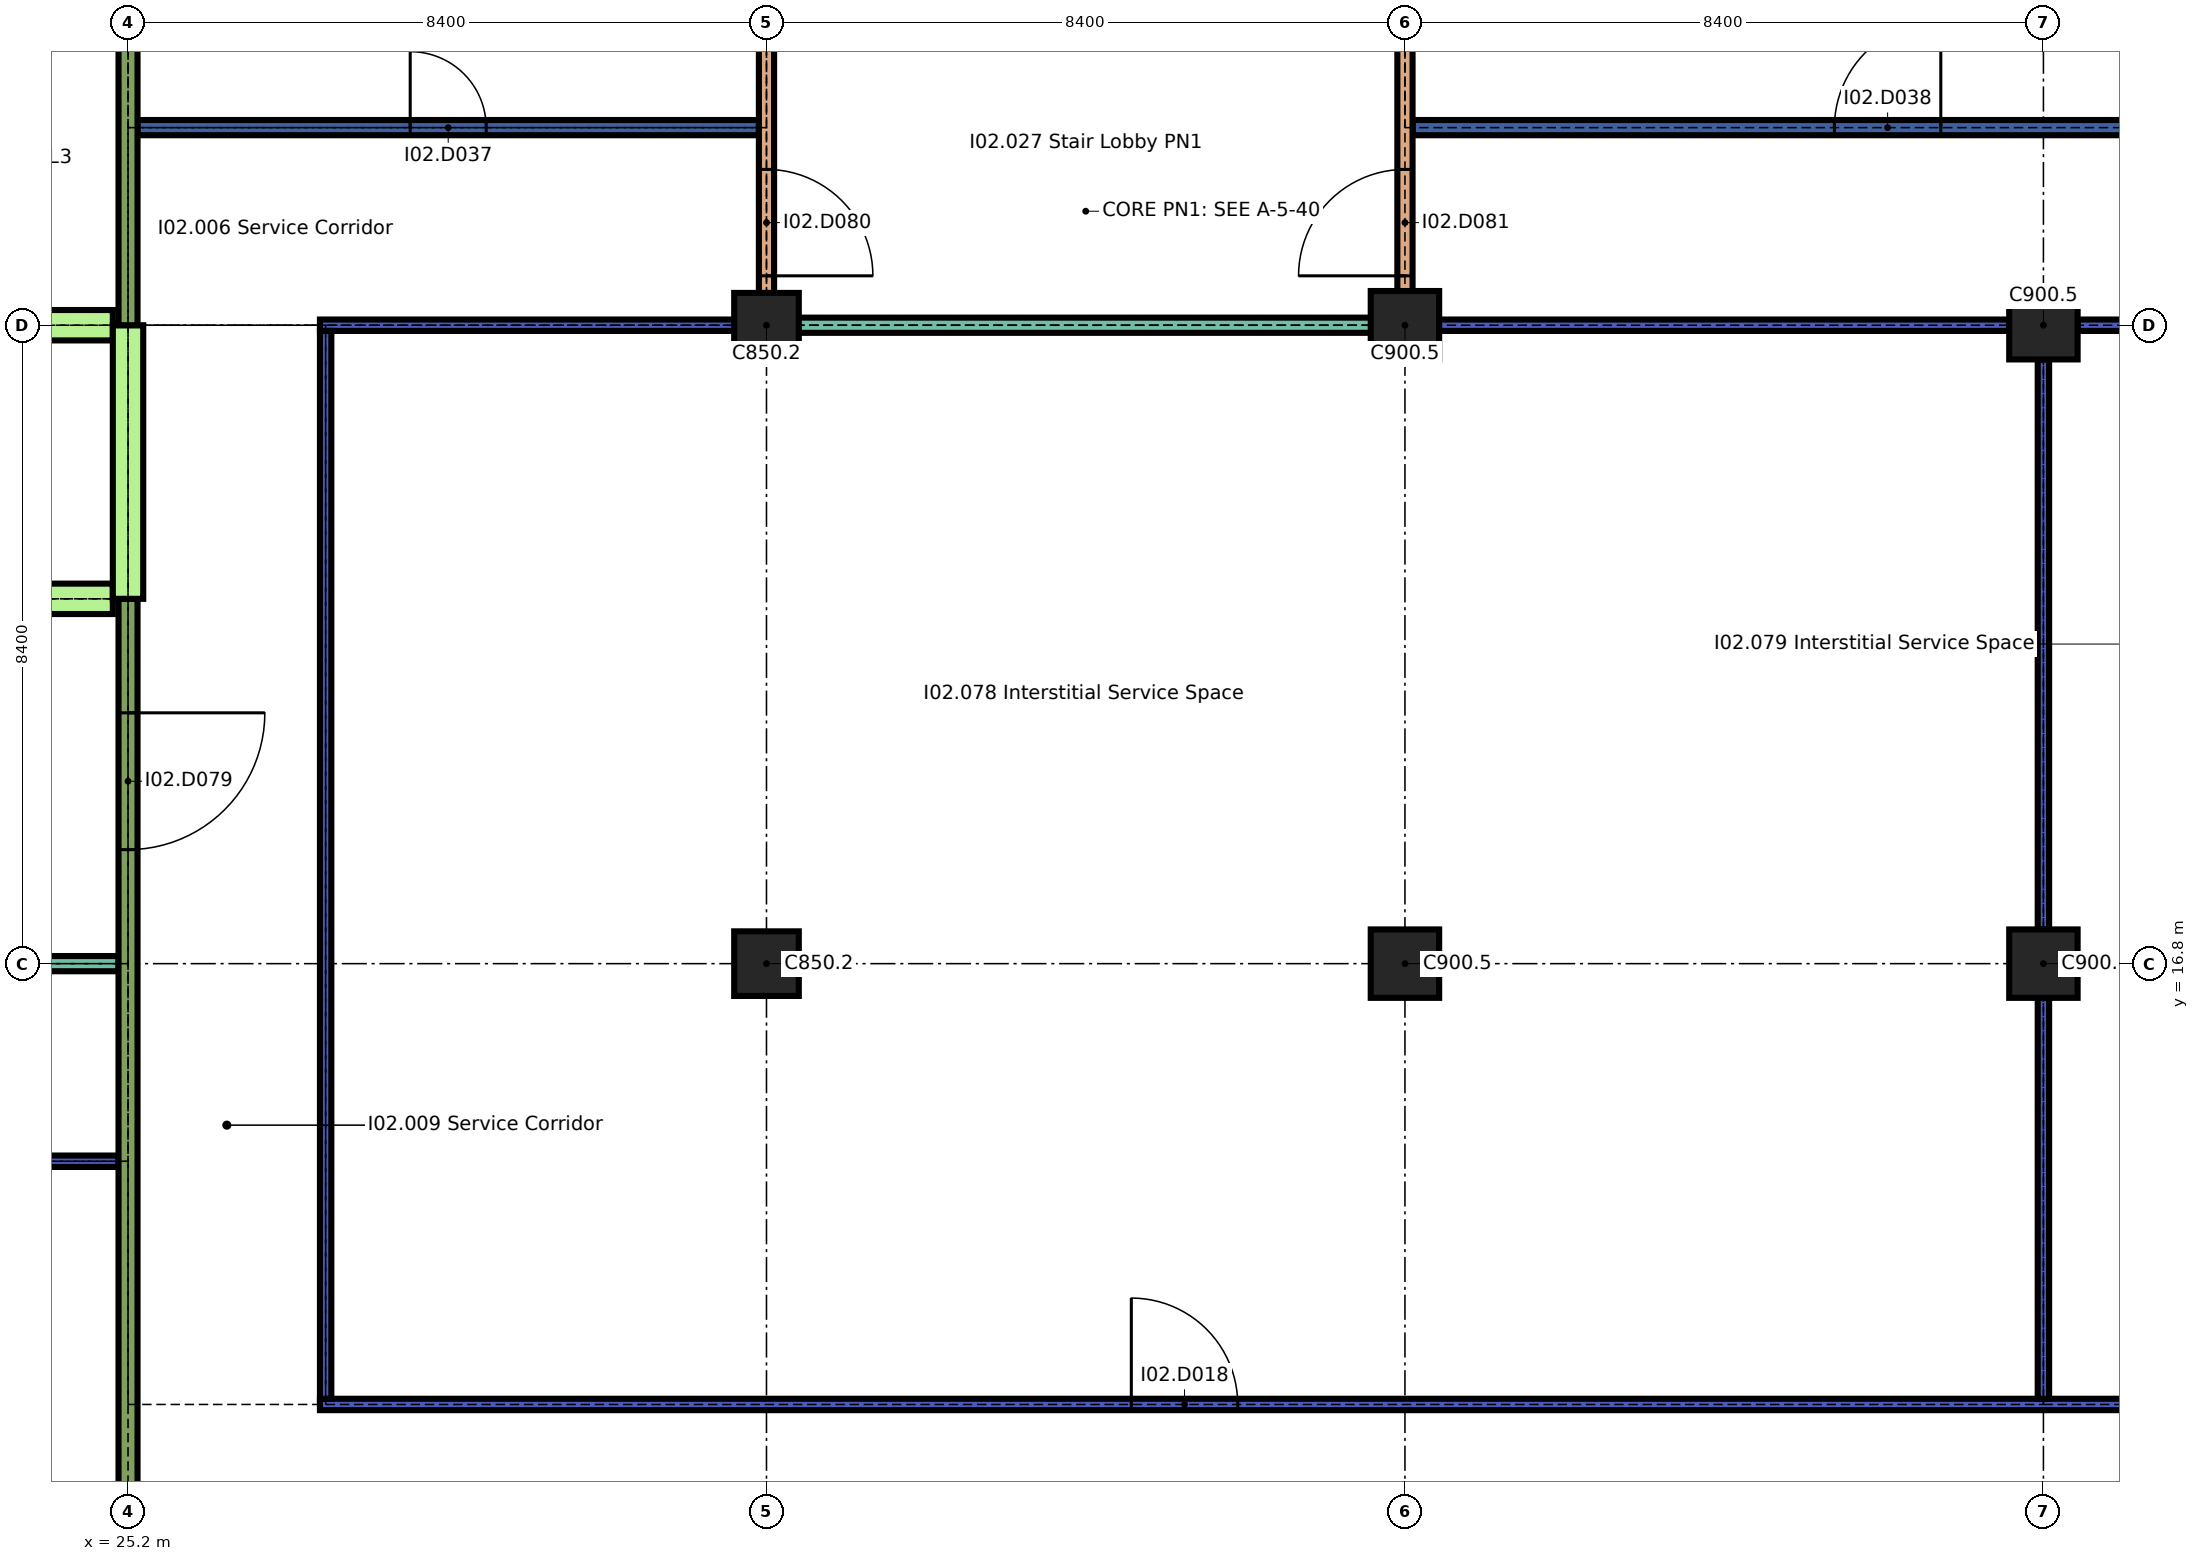
"""IFC4 building model, lengths in metres.
Left out: names, types, materials, properties, quantities, classifications, styles, units other than length and angle.
Written with IfcOpenShell. Run it as: python <this file> out.ifc"""

import sys

from ifc_helpers import new_model, si_unit, direction, frame, frame_2d, origin, origin_2d, place, context, subcontext, project, spatial, rectangle, extrude, element, fill, save


model = new_model("IFC4")
c1 = context("Model", 3, precision=1e-05, world=origin(), true_north=direction((0.0, 1.0)))
c2 = subcontext(c1, "Body", "Model", "MODEL_VIEW")
j1 = project(units=[si_unit("LENGTHUNIT", "METRE"), si_unit("PLANEANGLEUNIT", "RADIAN")], contexts=[c1])
p1 = place(None, origin())
s1 = spatial("IfcSite", under=j1, at=p1, CompositionType="ELEMENT")
p2 = place(p1, origin())
s2 = spatial("IfcBuilding", under=s1, at=p2, CompositionType="ELEMENT")
p3 = place(p2, frame((0.0, 0.0, 12.9)))
s3 = spatial("IfcBuildingStorey", under=s2, at=p3, CompositionType="ELEMENT", Elevation=12.9)
p4 = place(p3, frame((33.6, 16.8, 0.0), z_axis=(0.0, 0.0, 1.0), x_axis=(1.0, 0.0, 0.0)))
e1 = element("IfcColumn", 1, at=p4, inside=s3, PredefinedType="COLUMN", context=c2, shape_type="SweptSolid", body=[
    extrude(rectangle(XDim=0.85, YDim=0.85, at=origin_2d()), origin(), (0.0, 0.0, 1.0), 2.04),
])
for number, where, z_axis, x_axis in (
    (2, (42.0, 16.8, 0.0), (0.0, 0.0, 1.0), (1.0, 0.0, 0.0)),
    (3, (50.4, 16.8, 0.0), (0.0, 0.0, 1.0), (1.0, 0.0, 0.0)),
    (4, (50.4, 25.2, 0.0), (0.0, 0.0, 1.0), (1.0, 0.0, 0.0)),
):
    element("IfcColumn", number, at=place(p3, frame(where, z_axis=z_axis, x_axis=x_axis)), inside=s3, PredefinedType="COLUMN", context=c2, shape_type="SweptSolid", body=[
        extrude(rectangle(XDim=0.9, YDim=0.9, at=origin_2d()), origin(), (0.0, 0.0, 1.0), 2.04),
    ])
p5 = place(p3, frame((27.725, 11.0, 0.0), z_axis=(0.0, 0.0, 1.0), x_axis=(1.0, 0.0, 0.0)))
e5 = element("IfcWall", 5, at=p5, inside=s3, PredefinedType="PARTITIONING", context=c2, shape_type="SweptSolid", body=[
    extrude(rectangle(XDim=26.35, YDim=0.15, at=frame_2d((13.175, 0.0))), origin(), (0.0, 0.0, 1.0), 2.04),
])
p6 = place(p5, frame((10.675, 0.0, 0.0)))
e6 = element("IfcOpeningElement", 6, at=p6, cuts=e5, PredefinedType="OPENING", context=c2, shape_type="SweptSolid", body=[
    extrude(rectangle(XDim=1.4, YDim=2.0, at=frame_2d((0.7, 1.0))), frame((0.0, 0.085, 0.0), z_axis=(0.0, -1.0, 0.0), x_axis=(1.0, 0.0, 0.0)), (0.0, 0.0, 1.0), 0.17),
])
p7 = place(p3, frame((12.6, 14.2, 0.0), z_axis=(0.0, 0.0, 1.0), x_axis=(1.0, 0.0, 0.0)))
e7 = element("IfcWall", 7, at=p7, inside=s3, PredefinedType="PARTITIONING", context=c2, shape_type="SweptSolid", body=[
    extrude(rectangle(XDim=12.475, YDim=0.15, at=frame_2d((6.237, 0.0))), origin(), (0.0, 0.0, 1.0), 2.04),
])
p8 = place(p7, frame((5.538, 0.0, 0.0)))
e8 = element("IfcOpeningElement", 8, at=p8, cuts=e7, PredefinedType="OPENING", context=c2, shape_type="SweptSolid", body=[
    extrude(rectangle(XDim=1.4, YDim=2.0, at=frame_2d((0.7, 1.0))), frame((0.0, 0.085, 0.0), z_axis=(0.0, -1.0, 0.0), x_axis=(1.0, 0.0, 0.0)), (0.0, 0.0, 1.0), 0.17),
])
p9 = place(p3, frame((16.7, 16.8, 0.0), z_axis=(0.0, 0.0, 1.0), x_axis=(1.0, 0.0, 0.0)))
e9 = element("IfcWall", 9, at=p9, inside=s3, PredefinedType="PARTITIONING", context=c2, shape_type="SweptSolid", body=[
    extrude(rectangle(XDim=8.375, YDim=0.2, at=frame_2d((4.188, 0.0))), origin(), (0.0, 0.0, 1.0), 2.04),
])
p10 = place(p9, frame((3.337, 0.0, 0.0)))
e10 = element("IfcOpeningElement", 10, at=p10, cuts=e9, PredefinedType="OPENING", context=c2, shape_type="SweptSolid", body=[
    extrude(rectangle(XDim=1.8, YDim=2.0, at=frame_2d((0.9, 1.0))), frame((0.0, 0.11, 0.0), z_axis=(0.0, -1.0, 0.0), x_axis=(1.0, 0.0, 0.0)), (0.0, 0.0, 1.0), 0.22),
])
p11 = place(p3, frame((17.0, 21.6, 0.0), z_axis=(0.0, 0.0, 1.0), x_axis=(1.0, 0.0, 0.0)))
e11 = element("IfcWall", 11, at=p11, inside=s3, PredefinedType="SHEAR", context=c2, shape_type="SweptSolid", body=[
    extrude(rectangle(XDim=8.0, YDim=0.4, at=frame_2d((4.0, 0.0))), origin(), (0.0, 0.0, 1.0), 2.04),
])
p12 = place(p11, frame((1.3, 0.0, 0.0)))
e12 = element("IfcOpeningElement", 12, at=p12, cuts=e11, PredefinedType="OPENING", context=c2, shape_type="SweptSolid", body=[
    extrude(rectangle(XDim=1.4, YDim=2.0, at=frame_2d((0.7, 1.0))), frame((0.0, 0.21, 0.0), z_axis=(0.0, -1.0, 0.0), x_axis=(1.0, 0.0, 0.0)), (0.0, 0.0, 1.0), 0.42),
])
p13 = place(p3, frame((17.0, 25.2, 0.0), z_axis=(0.0, 0.0, 1.0), x_axis=(1.0, 0.0, 0.0)))
e13 = element("IfcWall", 13, at=p13, inside=s3, PredefinedType="SHEAR", context=c2, shape_type="SweptSolid", body=[
    extrude(rectangle(XDim=8.0, YDim=0.4, at=frame_2d((4.0, 0.0))), origin(), (0.0, 0.0, 1.0), 2.04),
])
p14 = place(p3, frame((27.725, 25.2, 0.0), z_axis=(0.0, 0.0, 1.0), x_axis=(1.0, 0.0, 0.0)))
e14 = element("IfcWall", 14, at=p14, inside=s3, PredefinedType="PARTITIONING", context=c2, shape_type="SweptSolid", body=[
    extrude(rectangle(XDim=5.875, YDim=0.15, at=frame_2d((2.938, 0.0))), origin(), (0.0, 0.0, 1.0), 2.04),
])
p15 = place(p3, frame((33.6, 25.2, 0.0), z_axis=(0.0, 0.0, 1.0), x_axis=(1.0, 0.0, 0.0)))
e15 = element("IfcWall", 15, at=p15, inside=s3, PredefinedType="PARTITIONING", context=c2, shape_type="SweptSolid", body=[
    extrude(rectangle(XDim=8.4, YDim=0.2, at=frame_2d((4.2, 0.0))), origin(), (0.0, 0.0, 1.0), 2.04),
])
p16 = place(p3, frame((42.0, 25.2, 0.0), z_axis=(0.0, 0.0, 1.0), x_axis=(1.0, 0.0, 0.0)))
e16 = element("IfcWall", 16, at=p16, inside=s3, PredefinedType="PARTITIONING", context=c2, shape_type="SweptSolid", body=[
    extrude(rectangle(XDim=7.95, YDim=0.15, at=frame_2d((3.975, 0.0))), origin(), (0.0, 0.0, 1.0), 2.04),
])
p17 = place(p3, frame((50.85, 25.2, 0.0), z_axis=(0.0, 0.0, 1.0), x_axis=(1.0, 0.0, 0.0)))
e17 = element("IfcWall", 17, at=p17, inside=s3, PredefinedType="PARTITIONING", context=c2, shape_type="SweptSolid", body=[
    extrude(rectangle(XDim=3.225, YDim=0.15, at=frame_2d((1.612, 0.0))), origin(), (0.0, 0.0, 1.0), 2.04),
])
p18 = place(p3, frame((25.325, 27.8, 0.0), z_axis=(0.0, 0.0, 1.0), x_axis=(1.0, 0.0, 0.0)))
e18 = element("IfcWall", 18, at=p18, inside=s3, PredefinedType="SOLIDWALL", context=c2, shape_type="SweptSolid", body=[
    extrude(rectangle(XDim=8.175, YDim=0.2, at=frame_2d((4.087, 0.0))), origin(), (0.0, 0.0, 1.0), 2.1),
])
p19 = place(p18, frame((3.587, 0.0, 0.0)))
e19 = element("IfcOpeningElement", 19, at=p19, cuts=e18, PredefinedType="OPENING", context=c2, shape_type="SweptSolid", body=[
    extrude(rectangle(XDim=1.0, YDim=2.0, at=frame_2d((0.5, 1.0))), frame((0.0, 0.11, 0.0), z_axis=(0.0, -1.0, 0.0), x_axis=(1.0, 0.0, 0.0)), (0.0, 0.0, 1.0), 0.22),
])
p20 = place(p3, frame((42.1, 27.8, 0.0), z_axis=(0.0, 0.0, 1.0), x_axis=(1.0, 0.0, 0.0)))
e20 = element("IfcWall", 20, at=p20, inside=s3, PredefinedType="SOLIDWALL", context=c2, shape_type="SweptSolid", body=[
    extrude(rectangle(XDim=64.1, YDim=0.2, at=frame_2d((32.05, 0.0))), origin(), (0.0, 0.0, 1.0), 2.1),
])
p21 = place(p20, frame((5.55, 0.0, 0.0)))
e21 = element("IfcOpeningElement", 21, at=p21, cuts=e20, PredefinedType="OPENING", context=c2, shape_type="SweptSolid", body=[
    extrude(rectangle(XDim=1.4, YDim=2.0, at=frame_2d((0.7, 1.0))), frame((0.0, 0.11, 0.0), z_axis=(0.0, -1.0, 0.0), x_axis=(1.0, 0.0, 0.0)), (0.0, 0.0, 1.0), 0.22),
])
p22 = place(p20, frame((16.2, 0.0, 0.0)))
e22 = element("IfcOpeningElement", 22, at=p22, cuts=e20, PredefinedType="OPENING", context=c2, shape_type="SweptSolid", body=[
    extrude(rectangle(XDim=1.0, YDim=2.0, at=frame_2d((0.5, 1.0))), frame((0.0, 0.11, 0.0), z_axis=(0.0, -1.0, 0.0), x_axis=(1.0, 0.0, 0.0)), (0.0, 0.0, 1.0), 0.22),
])
p23 = place(p20, frame((24.6, 0.0, 0.0)))
e23 = element("IfcOpeningElement", 23, at=p23, cuts=e20, PredefinedType="OPENING", context=c2, shape_type="SweptSolid", body=[
    extrude(rectangle(XDim=1.0, YDim=2.0, at=frame_2d((0.5, 1.0))), frame((0.0, 0.11, 0.0), z_axis=(0.0, -1.0, 0.0), x_axis=(1.0, 0.0, 0.0)), (0.0, 0.0, 1.0), 0.22),
])
p24 = place(p20, frame((30.9, 0.0, 0.0)))
e24 = element("IfcOpeningElement", 24, at=p24, cuts=e20, PredefinedType="OPENING", context=c2, shape_type="SweptSolid", body=[
    extrude(rectangle(XDim=1.0, YDim=2.0, at=frame_2d((0.5, 1.0))), frame((0.0, 0.11, 0.0), z_axis=(0.0, -1.0, 0.0), x_axis=(1.0, 0.0, 0.0)), (0.0, 0.0, 1.0), 0.22),
])
p25 = place(p20, frame((41.2, 0.0, 0.0)))
e25 = element("IfcOpeningElement", 25, at=p25, cuts=e20, PredefinedType="OPENING", context=c2, shape_type="SweptSolid", body=[
    extrude(rectangle(XDim=1.4, YDim=2.0, at=frame_2d((0.7, 1.0))), frame((0.0, 0.11, 0.0), z_axis=(0.0, -1.0, 0.0), x_axis=(1.0, 0.0, 0.0)), (0.0, 0.0, 1.0), 0.22),
])
p26 = place(p20, frame((54.0, 0.0, 0.0)))
e26 = element("IfcOpeningElement", 26, at=p26, cuts=e20, PredefinedType="OPENING", context=c2, shape_type="SweptSolid", body=[
    extrude(rectangle(XDim=1.0, YDim=2.0, at=frame_2d((0.5, 1.0))), frame((0.0, 0.11, 0.0), z_axis=(0.0, -1.0, 0.0), x_axis=(1.0, 0.0, 0.0)), (0.0, 0.0, 1.0), 0.22),
])
p27 = place(p20, frame((60.9, 0.0, 0.0)))
e27 = element("IfcOpeningElement", 27, at=p27, cuts=e20, PredefinedType="OPENING", context=c2, shape_type="SweptSolid", body=[
    extrude(rectangle(XDim=1.0, YDim=2.0, at=frame_2d((0.5, 1.0))), frame((0.0, 0.11, 0.0), z_axis=(0.0, -1.0, 0.0), x_axis=(1.0, 0.0, 0.0)), (0.0, 0.0, 1.0), 0.22),
])
p28 = place(p3, frame((25.2, 8.825, 0.0), z_axis=(0.0, 0.0, 1.0), x_axis=(0.0, 1.0, 0.0)))
e28 = element("IfcWall", 28, at=p28, inside=s3, PredefinedType="SOLIDWALL", context=c2, shape_type="SweptSolid", body=[
    extrude(rectangle(XDim=12.775, YDim=0.25, at=frame_2d((6.388, 0.0))), origin(), (0.0, 0.0, 1.0), 2.04),
])
p29 = place(p28, frame((9.475, 0.0, 0.0)))
e29 = element("IfcOpeningElement", 29, at=p29, cuts=e28, PredefinedType="OPENING", context=c2, shape_type="SweptSolid", body=[
    extrude(rectangle(XDim=1.8, YDim=2.0, at=frame_2d((0.9, 1.0))), frame((0.0, 0.135, 0.0), z_axis=(0.0, -1.0, 0.0), x_axis=(1.0, 0.0, 0.0)), (0.0, 0.0, 1.0), 0.27),
])
p30 = place(p3, frame((25.2, 21.6, 0.0), z_axis=(0.0, 0.0, 1.0), x_axis=(0.0, 1.0, 0.0)))
e30 = element("IfcWall", 30, at=p30, inside=s3, PredefinedType="SHEAR", context=c2, shape_type="SweptSolid", body=[
    extrude(rectangle(XDim=3.6, YDim=0.4, at=frame_2d((1.8, 0.0))), origin(), (0.0, 0.0, 1.0), 2.04),
])
p31 = place(p3, frame((25.2, 25.2, 0.0), z_axis=(0.0, 0.0, 1.0), x_axis=(0.0, 1.0, 0.0)))
e31 = element("IfcWall", 31, at=p31, inside=s3, PredefinedType="SOLIDWALL", context=c2, shape_type="SweptSolid", body=[
    extrude(rectangle(XDim=7.975, YDim=0.25, at=frame_2d((3.988, 0.0))), origin(), (0.0, 0.0, 1.0), 2.04),
])
p32 = place(p3, frame((27.8, 11.075, 0.0), z_axis=(0.0, 0.0, 1.0), x_axis=(0.0, 1.0, 0.0)))
e32 = element("IfcWall", 32, at=p32, inside=s3, PredefinedType="PARTITIONING", context=c2, shape_type="SweptSolid", body=[
    extrude(rectangle(XDim=14.05, YDim=0.15, at=frame_2d((7.025, 0.0))), origin(), (0.0, 0.0, 1.0), 2.04),
])
p33 = place(p3, frame((33.6, 25.3, 0.0), z_axis=(0.0, 0.0, 1.0), x_axis=(0.0, 1.0, 0.0)))
e33 = element("IfcWall", 33, at=p33, inside=s3, PredefinedType="PARTITIONING", context=c2, shape_type="SweptSolid", body=[
    extrude(rectangle(XDim=4.7, YDim=0.2, at=frame_2d((2.35, 0.0))), origin(), (0.0, 0.0, 1.0), 2.1),
])
p34 = place(p33, frame((0.55, 0.0, 0.0)))
e34 = element("IfcOpeningElement", 34, at=p34, cuts=e33, PredefinedType="OPENING", context=c2, shape_type="SweptSolid", body=[
    extrude(rectangle(XDim=1.4, YDim=2.0, at=frame_2d((0.7, 1.0))), frame((0.0, 0.11, 0.0), z_axis=(0.0, -1.0, 0.0), x_axis=(1.0, 0.0, 0.0)), (0.0, 0.0, 1.0), 0.22),
])
p35 = place(p3, frame((42.0, 25.3, 0.0), z_axis=(0.0, 0.0, 1.0), x_axis=(0.0, 1.0, 0.0)))
e35 = element("IfcWall", 35, at=p35, inside=s3, PredefinedType="PARTITIONING", context=c2, shape_type="SweptSolid", body=[
    extrude(rectangle(XDim=4.7, YDim=0.2, at=frame_2d((2.35, 0.0))), origin(), (0.0, 0.0, 1.0), 2.1),
])
p36 = place(p35, frame((0.55, 0.0, 0.0)))
e36 = element("IfcOpeningElement", 36, at=p36, cuts=e35, PredefinedType="OPENING", context=c2, shape_type="SweptSolid", body=[
    extrude(rectangle(XDim=1.4, YDim=2.0, at=frame_2d((0.7, 1.0))), frame((0.0, 0.11, 0.0), z_axis=(0.0, -1.0, 0.0), x_axis=(1.0, 0.0, 0.0)), (0.0, 0.0, 1.0), 0.22),
])
p37 = place(p3, frame((50.4, 11.075, 0.0), z_axis=(0.0, 0.0, 1.0), x_axis=(0.0, 1.0, 0.0)))
e37 = element("IfcWall", 37, at=p37, inside=s3, PredefinedType="PARTITIONING", context=c2, shape_type="SweptSolid", body=[
    extrude(rectangle(XDim=5.275, YDim=0.15, at=frame_2d((2.638, 0.0))), origin(), (0.0, 0.0, 1.0), 2.04),
])
p38 = place(p3, frame((50.4, 17.25, 0.0), z_axis=(0.0, 0.0, 1.0), x_axis=(0.0, 1.0, 0.0)))
e38 = element("IfcWall", 38, at=p38, inside=s3, PredefinedType="PARTITIONING", context=c2, shape_type="SweptSolid", body=[
    extrude(rectangle(XDim=7.5, YDim=0.15, at=frame_2d((3.75, 0.0))), origin(), (0.0, 0.0, 1.0), 2.04),
])
p39 = place(p3, frame((33.6, 25.2, 0.0), z_axis=(0.0, 0.0, 1.0), x_axis=(1.0, 0.0, 0.0)))
e39 = element("IfcColumn", 39, at=p39, inside=s3, PredefinedType="COLUMN", context=c2, shape_type="SweptSolid", body=[
    extrude(rectangle(XDim=0.85, YDim=0.85, at=origin_2d()), origin(), (0.0, 0.0, 1.0), 2.04),
])
p40 = place(p3, frame((42.0, 25.2, 0.0), z_axis=(0.0, 0.0, 1.0), x_axis=(1.0, 0.0, 0.0)))
e40 = element("IfcColumn", 40, at=p40, inside=s3, PredefinedType="COLUMN", context=c2, shape_type="SweptSolid", body=[
    extrude(rectangle(XDim=0.9, YDim=0.9, at=origin_2d()), origin(), (0.0, 0.0, 1.0), 2.04),
])
p41 = place(p6, origin())
e41 = element("IfcDoor", 41, at=p41, inside=s3, OperationType="SINGLE_SWING_RIGHT", PredefinedType="DOOR", context=c2, shape_type="SweptSolid", body=[
    extrude(rectangle(XDim=1.4, YDim=2.0, at=frame_2d((0.7, 1.0))), frame((0.0, 0.025, 0.0), z_axis=(0.0, -1.0, 0.0), x_axis=(1.0, 0.0, 0.0)), (0.0, 0.0, 1.0), 0.05),
])
fill(e6, e41)
p42 = place(p19, origin())
e42 = element("IfcDoor", 42, at=p42, inside=s3, OperationType="SINGLE_SWING_RIGHT", PredefinedType="DOOR", context=c2, shape_type="SweptSolid", body=[
    extrude(rectangle(XDim=1.0, YDim=2.0, at=frame_2d((0.5, 1.0))), frame((0.0, 0.025, 0.0), z_axis=(0.0, -1.0, 0.0), x_axis=(1.0, 0.0, 0.0)), (0.0, 0.0, 1.0), 0.05),
])
fill(e19, e42)
p43 = place(p21, origin())
e43 = element("IfcDoor", 43, at=p43, inside=s3, OperationType="SINGLE_SWING_LEFT", PredefinedType="DOOR", context=c2, shape_type="SweptSolid", body=[
    extrude(rectangle(XDim=1.4, YDim=2.0, at=frame_2d((0.7, 1.0))), frame((0.0, 0.025, 0.0), z_axis=(0.0, -1.0, 0.0), x_axis=(1.0, 0.0, 0.0)), (0.0, 0.0, 1.0), 0.05),
])
fill(e21, e43)
p44 = place(p29, origin())
e44 = element("IfcDoor", 44, at=p44, inside=s3, OperationType="SINGLE_SWING_RIGHT", PredefinedType="DOOR", context=c2, shape_type="SweptSolid", body=[
    extrude(rectangle(XDim=1.8, YDim=2.0, at=frame_2d((0.9, 1.0))), frame((0.0, 0.03, 0.0), z_axis=(0.0, -1.0, 0.0), x_axis=(1.0, 0.0, 0.0)), (0.0, 0.0, 1.0), 0.06),
])
fill(e29, e44)
p45 = place(p34, origin())
e45 = element("IfcDoor", 45, at=p45, inside=s3, OperationType="SINGLE_SWING_LEFT", PredefinedType="DOOR", context=c2, shape_type="SweptSolid", body=[
    extrude(rectangle(XDim=1.4, YDim=2.0, at=frame_2d((0.7, 1.0))), frame((0.0, 0.03, 0.0), z_axis=(0.0, -1.0, 0.0), x_axis=(1.0, 0.0, 0.0)), (0.0, 0.0, 1.0), 0.06),
])
fill(e34, e45)
p46 = place(p36, origin())
e46 = element("IfcDoor", 46, at=p46, inside=s3, OperationType="SINGLE_SWING_RIGHT", PredefinedType="DOOR", context=c2, shape_type="SweptSolid", body=[
    extrude(rectangle(XDim=1.4, YDim=2.0, at=frame_2d((0.7, 1.0))), frame((0.0, 0.03, 0.0), z_axis=(0.0, -1.0, 0.0), x_axis=(1.0, 0.0, 0.0)), (0.0, 0.0, 1.0), 0.06),
])
fill(e36, e46)
save(model, sys.argv[1])
